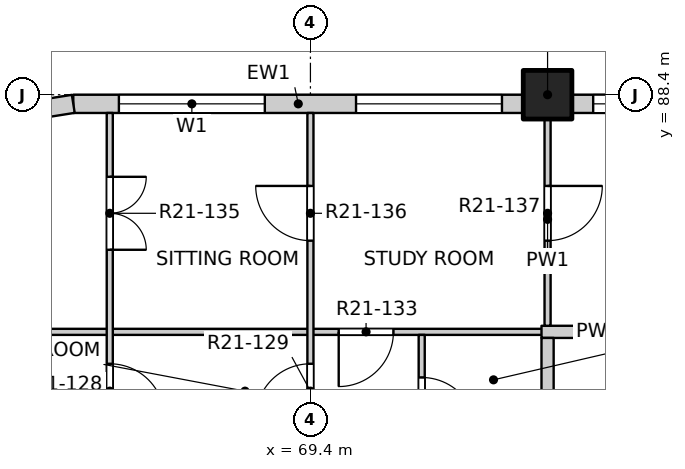
"""IFC4 building model, lengths in metres.
Left out: names, types, materials, properties, quantities, classifications, styles, units other than length and angle.
Written with IfcOpenShell. Run it as: python <this file> out.ifc"""

import sys

from ifc_helpers import new_model, si_unit, direction, frame, frame_2d, origin, origin_2d, place, context, subcontext, project, spatial, rectangle, extrude, element, fill, save


model = new_model("IFC4")
c1 = context("Model", 3, precision=1e-05, world=origin(), true_north=direction((0.0, 1.0)))
c2 = subcontext(c1, "Body", "Model", "MODEL_VIEW")
j1 = project(units=[si_unit("LENGTHUNIT", "METRE"), si_unit("PLANEANGLEUNIT", "RADIAN")], contexts=[c1])
p1 = place(None, origin())
s1 = spatial("IfcSite", under=j1, at=p1, CompositionType="ELEMENT")
p2 = place(p1, origin())
s2 = spatial("IfcBuilding", under=s1, at=p2, CompositionType="ELEMENT")
p3 = place(p2, frame((0.0, 0.0, 214.3)))
s3 = spatial("IfcBuildingStorey", under=s2, at=p3, CompositionType="ELEMENT", Elevation=214.3)
p4 = place(p3, frame((73.3, 88.4, -0.25), z_axis=(0.0, 0.0, 1.0), x_axis=(1.0, 0.0, 0.0)))
e1 = element("IfcColumn", 1, at=p4, inside=s3, PredefinedType="COLUMN", context=c2, shape_type="SweptSolid", body=[
    extrude(rectangle(XDim=0.8, YDim=0.8, at=origin_2d()), origin(), (0.0, 0.0, 1.0), 3.4),
])
p5 = place(p3, frame((65.5, 88.25, 0.0), z_axis=(0.0, 0.0, 1.0), x_axis=(1.0, 0.0, 0.0)))
e2 = element("IfcWall", 2, at=p5, inside=s3, PredefinedType="SOLIDWALL", context=c2, shape_type="SweptSolid", body=[
    extrude(rectangle(XDim=7.4, YDim=0.3, at=frame_2d((3.7, 0.0))), origin(), (0.0, 0.0, 1.0), 2.7),
])
p6 = place(p5, frame((0.75, 0.0, 0.9)))
e3 = element("IfcOpeningElement", 3, at=p6, cuts=e2, PredefinedType="OPENING", context=c2, shape_type="SweptSolid", body=[
    extrude(rectangle(XDim=2.4, YDim=1.8, at=frame_2d((1.2, 0.9))), frame((0.0, 0.16, 0.0), z_axis=(0.0, -1.0, 0.0), x_axis=(1.0, 0.0, 0.0)), (0.0, 0.0, 1.0), 0.32),
])
p7 = place(p5, frame((4.65, 0.0, 0.9)))
e4 = element("IfcOpeningElement", 4, at=p7, cuts=e2, PredefinedType="OPENING", context=c2, shape_type="SweptSolid", body=[
    extrude(rectangle(XDim=2.4, YDim=1.8, at=frame_2d((1.2, 0.9))), frame((0.0, 0.16, 0.0), z_axis=(0.0, -1.0, 0.0), x_axis=(1.0, 0.0, 0.0)), (0.0, 0.0, 1.0), 0.32),
])
p8 = place(p3, frame((73.7, 88.25, 0.0), z_axis=(0.0, 0.0, 1.0), x_axis=(1.0, 0.0, 0.0)))
e5 = element("IfcWall", 5, at=p8, inside=s3, PredefinedType="SOLIDWALL", context=c2, shape_type="SweptSolid", body=[
    extrude(rectangle(XDim=22.6, YDim=0.3, at=frame_2d((11.3, 0.0))), origin(), (0.0, 0.0, 1.0), 2.7),
])
p9 = place(p8, frame((0.35, 0.0, 0.9)))
e6 = element("IfcOpeningElement", 6, at=p9, cuts=e5, PredefinedType="OPENING", context=c2, shape_type="SweptSolid", body=[
    extrude(rectangle(XDim=2.4, YDim=1.8, at=frame_2d((1.2, 0.9))), frame((0.0, 0.16, 0.0), z_axis=(0.0, -1.0, 0.0), x_axis=(1.0, 0.0, 0.0)), (0.0, 0.0, 1.0), 0.32),
])
p10 = place(p8, frame((4.25, 0.0, 0.9)))
e7 = element("IfcOpeningElement", 7, at=p10, cuts=e5, PredefinedType="OPENING", context=c2, shape_type="SweptSolid", body=[
    extrude(rectangle(XDim=2.4, YDim=1.8, at=frame_2d((1.2, 0.9))), frame((0.0, 0.16, 0.0), z_axis=(0.0, -1.0, 0.0), x_axis=(1.0, 0.0, 0.0)), (0.0, 0.0, 1.0), 0.32),
])
p11 = place(p8, frame((8.15, 0.0, 0.9)))
e8 = element("IfcOpeningElement", 8, at=p11, cuts=e5, PredefinedType="OPENING", context=c2, shape_type="SweptSolid", body=[
    extrude(rectangle(XDim=2.4, YDim=1.8, at=frame_2d((1.2, 0.9))), frame((0.0, 0.16, 0.0), z_axis=(0.0, -1.0, 0.0), x_axis=(1.0, 0.0, 0.0)), (0.0, 0.0, 1.0), 0.32),
])
p12 = place(p8, frame((12.05, 0.0, 0.9)))
e9 = element("IfcOpeningElement", 9, at=p12, cuts=e5, PredefinedType="OPENING", context=c2, shape_type="SweptSolid", body=[
    extrude(rectangle(XDim=2.4, YDim=1.8, at=frame_2d((1.2, 0.9))), frame((0.0, 0.16, 0.0), z_axis=(0.0, -1.0, 0.0), x_axis=(1.0, 0.0, 0.0)), (0.0, 0.0, 1.0), 0.32),
])
p13 = place(p8, frame((15.95, 0.0, 0.9)))
e10 = element("IfcOpeningElement", 10, at=p13, cuts=e5, PredefinedType="OPENING", context=c2, shape_type="SweptSolid", body=[
    extrude(rectangle(XDim=2.4, YDim=1.8, at=frame_2d((1.2, 0.9))), frame((0.0, 0.16, 0.0), z_axis=(0.0, -1.0, 0.0), x_axis=(1.0, 0.0, 0.0)), (0.0, 0.0, 1.0), 0.32),
])
p14 = place(p8, frame((19.85, 0.0, 0.9)))
e11 = element("IfcOpeningElement", 11, at=p14, cuts=e5, PredefinedType="OPENING", context=c2, shape_type="SweptSolid", body=[
    extrude(rectangle(XDim=2.4, YDim=1.8, at=frame_2d((1.2, 0.9))), frame((0.0, 0.16, 0.0), z_axis=(0.0, -1.0, 0.0), x_axis=(1.0, 0.0, 0.0)), (0.0, 0.0, 1.0), 0.32),
])
p15 = place(p3, frame((65.5, 88.25, 0.0), z_axis=(0.0, 0.0, 1.0), x_axis=(-0.987678452879, -0.156496880861, 0.0)))
e12 = element("IfcWall", 12, at=p15, inside=s3, PredefinedType="SOLIDWALL", context=c2, shape_type="SweptSolid", body=[
    extrude(rectangle(XDim=1.173, YDim=0.3, at=frame_2d((0.586, 0.0))), origin(), (0.0, 0.0, 1.0), 2.7),
])
p16 = place(p3, frame((61.9, 84.5, 0.0), z_axis=(0.0, 0.0, 1.0), x_axis=(1.0, 0.0, 0.0)))
e13 = element("IfcWall", 13, at=p16, inside=s3, PredefinedType="PARTITIONING", context=c2, shape_type="SweptSolid", body=[
    extrude(rectangle(XDim=11.5, YDim=0.1, at=frame_2d((5.75, 0.0))), origin(), (0.0, 0.0, 1.0), 3.15),
])
p17 = place(p16, frame((7.965, 0.0, 0.0)))
e14 = element("IfcOpeningElement", 14, at=p17, cuts=e13, PredefinedType="OPENING", context=c2, shape_type="SweptSolid", body=[
    extrude(rectangle(XDim=0.9, YDim=2.1, at=frame_2d((0.45, 1.05))), frame((0.0, 0.06, 0.0), z_axis=(0.0, -1.0, 0.0), x_axis=(1.0, 0.0, 0.0)), (0.0, 0.0, 1.0), 0.12),
])
p18 = place(p3, frame((73.2, 84.5, 0.0), z_axis=(0.0, 0.0, 1.0), x_axis=(1.0, 0.0, 0.0)))
e15 = element("IfcWall", 15, at=p18, inside=s3, PredefinedType="PARTITIONING", context=c2, shape_type="SweptSolid", body=[
    extrude(rectangle(XDim=1.85, YDim=0.2, at=frame_2d((0.925, 0.0))), origin(), (0.0, 0.0, 1.0), 3.15),
])
p19 = place(p3, frame((66.1, 61.2, 0.0), z_axis=(0.0, 0.0, 1.0), x_axis=(0.0, 1.0, 0.0)))
e16 = element("IfcWall", 16, at=p19, inside=s3, PredefinedType="PARTITIONING", context=c2, shape_type="SweptSolid", body=[
    extrude(rectangle(XDim=26.9, YDim=0.1, at=frame_2d((13.45, 0.0))), origin(), (0.0, 0.0, 1.0), 3.15),
])
p20 = place(p19, frame((1.25, 0.0, 0.0)))
e17 = element("IfcOpeningElement", 17, at=p20, cuts=e16, PredefinedType="OPENING", context=c2, shape_type="SweptSolid", body=[
    extrude(rectangle(XDim=1.2, YDim=2.1, at=frame_2d((0.6, 1.05))), frame((0.0, 0.06, 0.0), z_axis=(0.0, -1.0, 0.0), x_axis=(1.0, 0.0, 0.0)), (0.0, 0.0, 1.0), 0.12),
])
p21 = place(p19, frame((5.15, 0.0, 0.0)))
e18 = element("IfcOpeningElement", 18, at=p21, cuts=e16, PredefinedType="OPENING", context=c2, shape_type="SweptSolid", body=[
    extrude(rectangle(XDim=1.2, YDim=2.1, at=frame_2d((0.6, 1.05))), frame((0.0, 0.06, 0.0), z_axis=(0.0, -1.0, 0.0), x_axis=(1.0, 0.0, 0.0)), (0.0, 0.0, 1.0), 0.12),
])
p22 = place(p19, frame((8.225, 0.0, 0.0)))
e19 = element("IfcOpeningElement", 19, at=p22, cuts=e16, PredefinedType="OPENING", context=c2, shape_type="SweptSolid", body=[
    extrude(rectangle(XDim=0.9, YDim=2.1, at=frame_2d((0.45, 1.05))), frame((0.0, 0.06, 0.0), z_axis=(0.0, -1.0, 0.0), x_axis=(1.0, 0.0, 0.0)), (0.0, 0.0, 1.0), 0.12),
])
p23 = place(p19, frame((10.175, 0.0, 0.0)))
e20 = element("IfcOpeningElement", 20, at=p23, cuts=e16, PredefinedType="OPENING", context=c2, shape_type="SweptSolid", body=[
    extrude(rectangle(XDim=0.9, YDim=2.1, at=frame_2d((0.45, 1.05))), frame((0.0, 0.06, 0.0), z_axis=(0.0, -1.0, 0.0), x_axis=(1.0, 0.0, 0.0)), (0.0, 0.0, 1.0), 0.12),
])
p24 = place(p19, frame((12.125, 0.0, 0.0)))
e21 = element("IfcOpeningElement", 21, at=p24, cuts=e16, PredefinedType="OPENING", context=c2, shape_type="SweptSolid", body=[
    extrude(rectangle(XDim=0.9, YDim=2.1, at=frame_2d((0.45, 1.05))), frame((0.0, 0.06, 0.0), z_axis=(0.0, -1.0, 0.0), x_axis=(1.0, 0.0, 0.0)), (0.0, 0.0, 1.0), 0.12),
])
p25 = place(p19, frame((14.075, 0.0, 0.0)))
e22 = element("IfcOpeningElement", 22, at=p25, cuts=e16, PredefinedType="OPENING", context=c2, shape_type="SweptSolid", body=[
    extrude(rectangle(XDim=0.9, YDim=2.1, at=frame_2d((0.45, 1.05))), frame((0.0, 0.06, 0.0), z_axis=(0.0, -1.0, 0.0), x_axis=(1.0, 0.0, 0.0)), (0.0, 0.0, 1.0), 0.12),
])
p26 = place(p19, frame((16.85, 0.0, 0.0)))
e23 = element("IfcOpeningElement", 23, at=p26, cuts=e16, PredefinedType="OPENING", context=c2, shape_type="SweptSolid", body=[
    extrude(rectangle(XDim=1.2, YDim=2.1, at=frame_2d((0.6, 1.05))), frame((0.0, 0.06, 0.0), z_axis=(0.0, -1.0, 0.0), x_axis=(1.0, 0.0, 0.0)), (0.0, 0.0, 1.0), 0.12),
])
p27 = place(p19, frame((19.925, 0.0, 0.0)))
e24 = element("IfcOpeningElement", 24, at=p27, cuts=e16, PredefinedType="OPENING", context=c2, shape_type="SweptSolid", body=[
    extrude(rectangle(XDim=0.9, YDim=2.1, at=frame_2d((0.45, 1.05))), frame((0.0, 0.06, 0.0), z_axis=(0.0, -1.0, 0.0), x_axis=(1.0, 0.0, 0.0)), (0.0, 0.0, 1.0), 0.12),
])
p28 = place(p19, frame((21.875, 0.0, 0.0)))
e25 = element("IfcOpeningElement", 25, at=p28, cuts=e16, PredefinedType="OPENING", context=c2, shape_type="SweptSolid", body=[
    extrude(rectangle(XDim=0.9, YDim=2.1, at=frame_2d((0.45, 1.05))), frame((0.0, 0.06, 0.0), z_axis=(0.0, -1.0, 0.0), x_axis=(1.0, 0.0, 0.0)), (0.0, 0.0, 1.0), 0.12),
])
p29 = place(p19, frame((24.65, 0.0, 0.0)))
e26 = element("IfcOpeningElement", 26, at=p29, cuts=e16, PredefinedType="OPENING", context=c2, shape_type="SweptSolid", body=[
    extrude(rectangle(XDim=1.2, YDim=2.1, at=frame_2d((0.6, 1.05))), frame((0.0, 0.06, 0.0), z_axis=(0.0, -1.0, 0.0), x_axis=(1.0, 0.0, 0.0)), (0.0, 0.0, 1.0), 0.12),
])
p30 = place(p3, frame((69.4, 41.9, 0.0), z_axis=(0.0, 0.0, 1.0), x_axis=(0.0, 1.0, 0.0)))
e27 = element("IfcWall", 27, at=p30, inside=s3, PredefinedType="PARTITIONING", context=c2, shape_type="SweptSolid", body=[
    extrude(rectangle(XDim=46.2, YDim=0.1, at=frame_2d((23.1, 0.0))), origin(), (0.0, 0.0, 1.0), 3.15),
])
p31 = place(p30, frame((1.2, 0.0, 0.0)))
e28 = element("IfcOpeningElement", 28, at=p31, cuts=e27, PredefinedType="OPENING", context=c2, shape_type="SweptSolid", body=[
    extrude(rectangle(XDim=0.9, YDim=2.1, at=frame_2d((0.45, 1.05))), frame((0.0, 0.06, 0.0), z_axis=(0.0, -1.0, 0.0), x_axis=(1.0, 0.0, 0.0)), (0.0, 0.0, 1.0), 0.12),
])
p32 = place(p30, frame((6.025, 0.0, 0.0)))
e29 = element("IfcOpeningElement", 29, at=p32, cuts=e27, PredefinedType="OPENING", context=c2, shape_type="SweptSolid", body=[
    extrude(rectangle(XDim=0.9, YDim=2.1, at=frame_2d((0.45, 1.05))), frame((0.0, 0.06, 0.0), z_axis=(0.0, -1.0, 0.0), x_axis=(1.0, 0.0, 0.0)), (0.0, 0.0, 1.0), 0.12),
])
p33 = place(p30, frame((9.0, 0.0, 0.0)))
e30 = element("IfcOpeningElement", 30, at=p33, cuts=e27, PredefinedType="OPENING", context=c2, shape_type="SweptSolid", body=[
    extrude(rectangle(XDim=0.9, YDim=2.1, at=frame_2d((0.45, 1.05))), frame((0.0, 0.06, 0.0), z_axis=(0.0, -1.0, 0.0), x_axis=(1.0, 0.0, 0.0)), (0.0, 0.0, 1.0), 0.12),
])
p34 = place(p30, frame((12.9, 0.0, 0.0)))
e31 = element("IfcOpeningElement", 31, at=p34, cuts=e27, PredefinedType="OPENING", context=c2, shape_type="SweptSolid", body=[
    extrude(rectangle(XDim=0.9, YDim=2.1, at=frame_2d((0.45, 1.05))), frame((0.0, 0.06, 0.0), z_axis=(0.0, -1.0, 0.0), x_axis=(1.0, 0.0, 0.0)), (0.0, 0.0, 1.0), 0.12),
])
p35 = place(p30, frame((17.775, 0.0, 0.0)))
e32 = element("IfcOpeningElement", 32, at=p35, cuts=e27, PredefinedType="OPENING", context=c2, shape_type="SweptSolid", body=[
    extrude(rectangle(XDim=0.9, YDim=2.1, at=frame_2d((0.45, 1.05))), frame((0.0, 0.06, 0.0), z_axis=(0.0, -1.0, 0.0), x_axis=(1.0, 0.0, 0.0)), (0.0, 0.0, 1.0), 0.12),
])
p36 = place(p30, frame((20.7, 0.0, 0.0)))
e33 = element("IfcOpeningElement", 33, at=p36, cuts=e27, PredefinedType="OPENING", context=c2, shape_type="SweptSolid", body=[
    extrude(rectangle(XDim=0.9, YDim=2.1, at=frame_2d((0.45, 1.05))), frame((0.0, 0.06, 0.0), z_axis=(0.0, -1.0, 0.0), x_axis=(1.0, 0.0, 0.0)), (0.0, 0.0, 1.0), 0.12),
])
p37 = place(p30, frame((24.6, 0.0, 0.0)))
e34 = element("IfcOpeningElement", 34, at=p37, cuts=e27, PredefinedType="OPENING", context=c2, shape_type="SweptSolid", body=[
    extrude(rectangle(XDim=0.9, YDim=2.1, at=frame_2d((0.45, 1.05))), frame((0.0, 0.06, 0.0), z_axis=(0.0, -1.0, 0.0), x_axis=(1.0, 0.0, 0.0)), (0.0, 0.0, 1.0), 0.12),
])
p38 = place(p30, frame((29.425, 0.0, 0.0)))
e35 = element("IfcOpeningElement", 35, at=p38, cuts=e27, PredefinedType="OPENING", context=c2, shape_type="SweptSolid", body=[
    extrude(rectangle(XDim=0.9, YDim=2.1, at=frame_2d((0.45, 1.05))), frame((0.0, 0.06, 0.0), z_axis=(0.0, -1.0, 0.0), x_axis=(1.0, 0.0, 0.0)), (0.0, 0.0, 1.0), 0.12),
])
p39 = place(p30, frame((33.375, 0.0, 0.0)))
e36 = element("IfcOpeningElement", 36, at=p39, cuts=e27, PredefinedType="OPENING", context=c2, shape_type="SweptSolid", body=[
    extrude(rectangle(XDim=0.9, YDim=2.1, at=frame_2d((0.45, 1.05))), frame((0.0, 0.06, 0.0), z_axis=(0.0, -1.0, 0.0), x_axis=(1.0, 0.0, 0.0)), (0.0, 0.0, 1.0), 0.12),
])
p40 = place(p30, frame((36.3, 0.0, 0.0)))
e37 = element("IfcOpeningElement", 37, at=p40, cuts=e27, PredefinedType="OPENING", context=c2, shape_type="SweptSolid", body=[
    extrude(rectangle(XDim=0.9, YDim=2.1, at=frame_2d((0.45, 1.05))), frame((0.0, 0.06, 0.0), z_axis=(0.0, -1.0, 0.0), x_axis=(1.0, 0.0, 0.0)), (0.0, 0.0, 1.0), 0.12),
])
p41 = place(p30, frame((41.175, 0.0, 0.0)))
e38 = element("IfcOpeningElement", 38, at=p41, cuts=e27, PredefinedType="OPENING", context=c2, shape_type="SweptSolid", body=[
    extrude(rectangle(XDim=0.9, YDim=2.1, at=frame_2d((0.45, 1.05))), frame((0.0, 0.06, 0.0), z_axis=(0.0, -1.0, 0.0), x_axis=(1.0, 0.0, 0.0)), (0.0, 0.0, 1.0), 0.12),
])
p42 = place(p30, frame((44.1, 0.0, 0.0)))
e39 = element("IfcOpeningElement", 39, at=p42, cuts=e27, PredefinedType="OPENING", context=c2, shape_type="SweptSolid", body=[
    extrude(rectangle(XDim=0.9, YDim=2.1, at=frame_2d((0.45, 1.05))), frame((0.0, 0.06, 0.0), z_axis=(0.0, -1.0, 0.0), x_axis=(1.0, 0.0, 0.0)), (0.0, 0.0, 1.0), 0.12),
])
p43 = place(p3, frame((71.23, 78.7, 0.0), z_axis=(0.0, 0.0, 1.0), x_axis=(0.0, 1.0, 0.0)))
e40 = element("IfcWall", 40, at=p43, inside=s3, PredefinedType="PARTITIONING", context=c2, shape_type="SweptSolid", body=[
    extrude(rectangle(XDim=5.75, YDim=0.1, at=frame_2d((2.875, 0.0))), origin(), (0.0, 0.0, 1.0), 3.15),
])
p44 = place(p43, frame((1.225, 0.0, 0.0)))
e41 = element("IfcOpeningElement", 41, at=p44, cuts=e40, PredefinedType="OPENING", context=c2, shape_type="SweptSolid", body=[
    extrude(rectangle(XDim=0.9, YDim=2.1, at=frame_2d((0.45, 1.05))), frame((0.0, 0.06, 0.0), z_axis=(0.0, -1.0, 0.0), x_axis=(1.0, 0.0, 0.0)), (0.0, 0.0, 1.0), 0.12),
])
p45 = place(p43, frame((4.15, 0.0, 0.0)))
e42 = element("IfcOpeningElement", 42, at=p45, cuts=e40, PredefinedType="OPENING", context=c2, shape_type="SweptSolid", body=[
    extrude(rectangle(XDim=0.9, YDim=2.1, at=frame_2d((0.45, 1.05))), frame((0.0, 0.06, 0.0), z_axis=(0.0, -1.0, 0.0), x_axis=(1.0, 0.0, 0.0)), (0.0, 0.0, 1.0), 0.12),
])
p46 = place(p3, frame((73.3, 49.5, 0.0), z_axis=(0.0, 0.0, 1.0), x_axis=(0.0, 1.0, 0.0)))
e43 = element("IfcWall", 43, at=p46, inside=s3, PredefinedType="PARTITIONING", context=c2, shape_type="SweptSolid", body=[
    extrude(rectangle(XDim=34.9, YDim=0.2, at=frame_2d((17.45, 0.0))), origin(), (0.0, 0.0, 1.0), 3.15),
])
p47 = place(p46, frame((3.325, 0.0, 0.0)))
e44 = element("IfcOpeningElement", 44, at=p47, cuts=e43, PredefinedType="OPENING", context=c2, shape_type="SweptSolid", body=[
    extrude(rectangle(XDim=1.0, YDim=2.1, at=frame_2d((0.5, 1.05))), frame((0.0, 0.11, 0.0), z_axis=(0.0, -1.0, 0.0), x_axis=(1.0, 0.0, 0.0)), (0.0, 0.0, 1.0), 0.22),
])
p48 = place(p46, frame((18.875, 0.0, 0.0)))
e45 = element("IfcOpeningElement", 45, at=p48, cuts=e43, PredefinedType="OPENING", context=c2, shape_type="SweptSolid", body=[
    extrude(rectangle(XDim=1.0, YDim=2.1, at=frame_2d((0.5, 1.05))), frame((0.0, 0.11, 0.0), z_axis=(0.0, -1.0, 0.0), x_axis=(1.0, 0.0, 0.0)), (0.0, 0.0, 1.0), 0.22),
])
p49 = place(p46, frame((29.325, 0.0, 0.0)))
e46 = element("IfcOpeningElement", 46, at=p49, cuts=e43, PredefinedType="OPENING", context=c2, shape_type="SweptSolid", body=[
    extrude(rectangle(XDim=1.0, YDim=2.1, at=frame_2d((0.5, 1.05))), frame((0.0, 0.11, 0.0), z_axis=(0.0, -1.0, 0.0), x_axis=(1.0, 0.0, 0.0)), (0.0, 0.0, 1.0), 0.22),
])
p50 = place(p3, frame((73.3, 84.6, 0.0), z_axis=(0.0, 0.0, 1.0), x_axis=(0.0, 1.0, 0.0)))
e47 = element("IfcWall", 47, at=p50, inside=s3, PredefinedType="PARTITIONING", context=c2, shape_type="SweptSolid", body=[
    extrude(rectangle(XDim=3.5, YDim=0.1, at=frame_2d((1.75, 0.0))), origin(), (0.0, 0.0, 1.0), 3.15),
])
p51 = place(p50, frame((1.4, 0.0, 0.0)))
e48 = element("IfcOpeningElement", 48, at=p51, cuts=e47, PredefinedType="OPENING", context=c2, shape_type="SweptSolid", body=[
    extrude(rectangle(XDim=0.9, YDim=2.1, at=frame_2d((0.45, 1.05))), frame((0.0, 0.06, 0.0), z_axis=(0.0, -1.0, 0.0), x_axis=(1.0, 0.0, 0.0)), (0.0, 0.0, 1.0), 0.12),
])
p52 = place(p6, origin())
e49 = element("IfcWindow", 49, at=p52, inside=s3, PartitioningType="DOUBLE_PANEL_VERTICAL", PredefinedType="WINDOW", context=c2, shape_type="SweptSolid", body=[
    extrude(rectangle(XDim=2.4, YDim=1.8, at=frame_2d((1.2, 0.9))), frame((0.0, 0.03, 0.0), z_axis=(0.0, -1.0, 0.0), x_axis=(1.0, 0.0, 0.0)), (0.0, 0.0, 1.0), 0.06),
])
fill(e3, e49)
p53 = place(p7, origin())
e50 = element("IfcWindow", 50, at=p53, inside=s3, PartitioningType="DOUBLE_PANEL_VERTICAL", PredefinedType="WINDOW", context=c2, shape_type="SweptSolid", body=[
    extrude(rectangle(XDim=2.4, YDim=1.8, at=frame_2d((1.2, 0.9))), frame((0.0, 0.03, 0.0), z_axis=(0.0, -1.0, 0.0), x_axis=(1.0, 0.0, 0.0)), (0.0, 0.0, 1.0), 0.06),
])
fill(e4, e50)
p54 = place(p9, origin())
e51 = element("IfcWindow", 51, at=p54, inside=s3, PartitioningType="DOUBLE_PANEL_VERTICAL", PredefinedType="WINDOW", context=c2, shape_type="SweptSolid", body=[
    extrude(rectangle(XDim=2.4, YDim=1.8, at=frame_2d((1.2, 0.9))), frame((0.0, 0.03, 0.0), z_axis=(0.0, -1.0, 0.0), x_axis=(1.0, 0.0, 0.0)), (0.0, 0.0, 1.0), 0.06),
])
fill(e6, e51)
p55 = place(p45, origin())
e52 = element("IfcDoor", 52, at=p55, inside=s3, OperationType="SINGLE_SWING_RIGHT", PredefinedType="DOOR", context=c2, shape_type="SweptSolid", body=[
    extrude(rectangle(XDim=0.9, YDim=2.1, at=frame_2d((0.45, 1.05))), frame((0.0, 0.025, 0.0), z_axis=(0.0, -1.0, 0.0), x_axis=(1.0, 0.0, 0.0)), (0.0, 0.0, 1.0), 0.05),
])
fill(e42, e52)
p56 = place(p28, origin())
e53 = element("IfcDoor", 53, at=p56, inside=s3, OperationType="SINGLE_SWING_RIGHT", PredefinedType="DOOR", context=c2, shape_type="SweptSolid", body=[
    extrude(rectangle(XDim=0.9, YDim=2.1, at=frame_2d((0.45, 1.05))), frame((0.0, 0.025, 0.0), z_axis=(0.0, -1.0, 0.0), x_axis=(1.0, 0.0, 0.0)), (0.0, 0.0, 1.0), 0.05),
])
fill(e25, e53)
p57 = place(p41, origin())
e54 = element("IfcDoor", 54, at=p57, inside=s3, OperationType="SINGLE_SWING_LEFT", PredefinedType="DOOR", context=c2, shape_type="SweptSolid", body=[
    extrude(rectangle(XDim=0.9, YDim=2.1, at=frame_2d((0.45, 1.05))), frame((0.0, 0.025, 0.0), z_axis=(0.0, -1.0, 0.0), x_axis=(1.0, 0.0, 0.0)), (0.0, 0.0, 1.0), 0.05),
])
fill(e38, e54)
p58 = place(p17, origin())
e55 = element("IfcDoor", 55, at=p58, inside=s3, OperationType="SINGLE_SWING_RIGHT", PredefinedType="DOOR", context=c2, shape_type="SweptSolid", body=[
    extrude(rectangle(XDim=0.9, YDim=2.1, at=frame_2d((0.45, 1.05))), frame((0.0, 0.025, 0.0), z_axis=(0.0, -1.0, 0.0), x_axis=(1.0, 0.0, 0.0)), (0.0, 0.0, 1.0), 0.05),
])
fill(e14, e55)
p59 = place(p29, origin())
e56 = element("IfcDoor", 56, at=p59, inside=s3, OperationType="DOUBLE_DOOR_SINGLE_SWING", PredefinedType="DOOR", context=c2, shape_type="SweptSolid", body=[
    extrude(rectangle(XDim=1.2, YDim=2.1, at=frame_2d((0.6, 1.05))), frame((0.0, 0.025, 0.0), z_axis=(0.0, -1.0, 0.0), x_axis=(1.0, 0.0, 0.0)), (0.0, 0.0, 1.0), 0.05),
])
fill(e26, e56)
p60 = place(p42, origin())
e57 = element("IfcDoor", 57, at=p60, inside=s3, OperationType="SINGLE_SWING_RIGHT", PredefinedType="DOOR", context=c2, shape_type="SweptSolid", body=[
    extrude(rectangle(XDim=0.9, YDim=2.1, at=frame_2d((0.45, 1.05))), frame((0.0, 0.025, 0.0), z_axis=(0.0, -1.0, 0.0), x_axis=(1.0, 0.0, 0.0)), (0.0, 0.0, 1.0), 0.05),
])
fill(e39, e57)
p61 = place(p51, origin())
e58 = element("IfcDoor", 58, at=p61, inside=s3, OperationType="SINGLE_SWING_LEFT", PredefinedType="DOOR", context=c2, shape_type="SweptSolid", body=[
    extrude(rectangle(XDim=0.9, YDim=2.1, at=frame_2d((0.45, 1.05))), frame((0.0, 0.025, 0.0), z_axis=(0.0, -1.0, 0.0), x_axis=(1.0, 0.0, 0.0)), (0.0, 0.0, 1.0), 0.05),
])
fill(e48, e58)
save(model, sys.argv[1])
